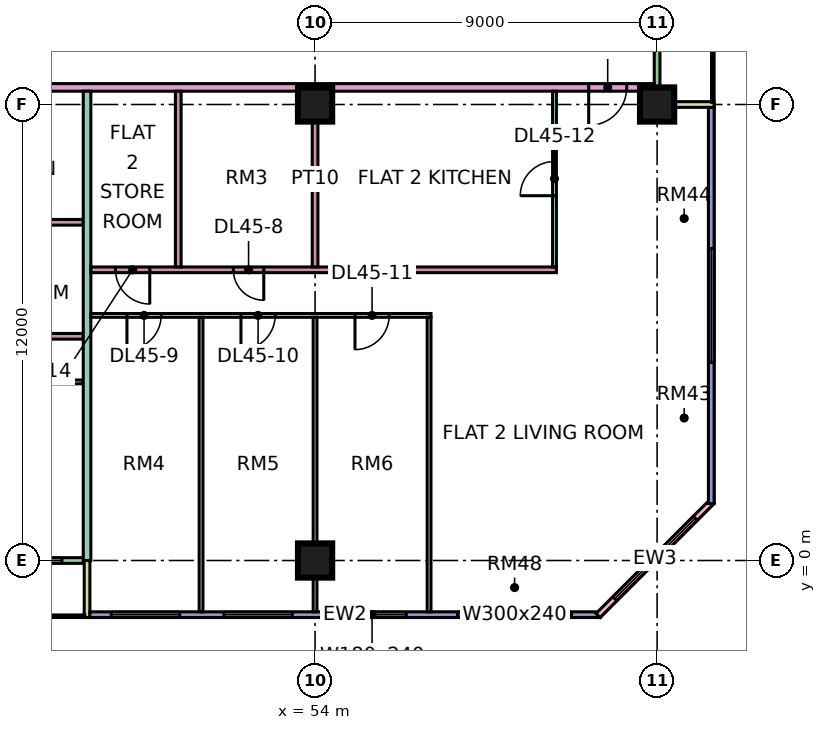
"""IFC4 building model, lengths in metres.
Left out: names, types, materials, properties, quantities, classifications, styles, units other than length and angle.
Written with IfcOpenShell. Run it as: python <this file> out.ifc"""

import sys

from ifc_helpers import new_model, si_unit, direction, frame, frame_2d, origin, origin_2d, place, context, subcontext, project, spatial, rectangle, extrude, element, fill, save


model = new_model("IFC4")
c1 = context("Model", 3, precision=1e-05, world=origin(), true_north=direction((0.0, 1.0)))
c2 = subcontext(c1, "Body", "Model", "MODEL_VIEW")
j1 = project(units=[si_unit("LENGTHUNIT", "METRE"), si_unit("PLANEANGLEUNIT", "RADIAN")], contexts=[c1])
p1 = place(None, origin())
s1 = spatial("IfcSite", under=j1, at=p1, CompositionType="ELEMENT")
p2 = place(p1, origin())
s2 = spatial("IfcBuilding", under=s1, at=p2, CompositionType="ELEMENT")
p3 = place(p2, frame((0.0, 0.0, 194.9)))
s3 = spatial("IfcBuildingStorey", under=s2, at=p3, CompositionType="ELEMENT", Elevation=194.9)
for number, where, z_axis, x_axis in (
    (1, (54.0, 0.0, 0.0), (0.0, 0.0, 1.0), (1.0, 0.0, 0.0)),
    (2, (54.0, 12.0, 0.0), (0.0, 0.0, 1.0), (1.0, 0.0, 0.0)),
    (3, (63.0, 12.0, 0.0), (0.0, 0.0, 1.0), (1.0, 0.0, 0.0)),
):
    element("IfcColumn", number, at=place(p3, frame(where, z_axis=z_axis, x_axis=x_axis)), inside=s3, PredefinedType="COLUMN", context=c2, shape_type="SweptSolid", body=[
        extrude(rectangle(XDim=0.9, YDim=0.9, at=origin_2d()), origin(), (0.0, 0.0, 1.0), 3.75),
    ])
p4 = place(p3, frame((36.075, 0.0, 0.0), z_axis=(0.0, 0.0, 1.0), x_axis=(1.0, 0.0, 0.0)))
e4 = element("IfcWall", 4, at=p4, inside=s3, PredefinedType="SOLIDWALL", context=c2, shape_type="SweptSolid", body=[
    extrude(rectangle(XDim=11.85, YDim=0.15, at=frame_2d((5.925, 0.0))), origin(), (0.0, 0.0, 1.0), 3.35),
])
p5 = place(p4, frame((1.1, 0.0, 0.0)))
e5 = element("IfcOpeningElement", 5, at=p5, cuts=e4, PredefinedType="OPENING", context=c2, shape_type="SweptSolid", body=[
    extrude(rectangle(XDim=1.2, YDim=2.4, at=frame_2d((0.6, 1.2))), frame((0.0, 0.085, 0.0), z_axis=(0.0, -1.0, 0.0), x_axis=(1.0, 0.0, 0.0)), (0.0, 0.0, 1.0), 0.17),
])
p6 = place(p4, frame((4.15, 0.0, 0.45)))
e6 = element("IfcOpeningElement", 6, at=p6, cuts=e4, PredefinedType="OPENING", context=c2, shape_type="SweptSolid", body=[
    extrude(rectangle(XDim=3.0, YDim=2.4, at=frame_2d((1.5, 1.2))), frame((0.0, 0.085, 0.0), z_axis=(0.0, -1.0, 0.0), x_axis=(1.0, 0.0, 0.0)), (0.0, 0.0, 1.0), 0.17),
])
p7 = place(p4, frame((10.062, 0.0, 0.45)))
e7 = element("IfcOpeningElement", 7, at=p7, cuts=e4, PredefinedType="OPENING", context=c2, shape_type="SweptSolid", body=[
    extrude(rectangle(XDim=1.2, YDim=2.4, at=frame_2d((0.6, 1.2))), frame((0.0, 0.085, 0.0), z_axis=(0.0, -1.0, 0.0), x_axis=(1.0, 0.0, 0.0)), (0.0, 0.0, 1.0), 0.17),
])
p8 = place(p3, frame((48.0, -1.5, 0.0), z_axis=(0.0, 0.0, 1.0), x_axis=(0.0, 1.0, 0.0)))
e8 = element("IfcWall", 8, at=p8, inside=s3, PredefinedType="SOLIDWALL", context=c2, shape_type="SweptSolid", body=[
    extrude(rectangle(XDim=1.5, YDim=0.15, at=frame_2d((0.75, 0.0))), origin(), (0.0, 0.0, 1.0), 3.35),
])
p9 = place(p3, frame((48.075, -1.425, 0.0), z_axis=(0.0, 0.0, 1.0), x_axis=(1.0, 0.0, 0.0)))
e9 = element("IfcWall", 9, at=p9, inside=s3, PredefinedType="SOLIDWALL", context=c2, shape_type="SweptSolid", body=[
    extrude(rectangle(XDim=13.425, YDim=0.15, at=frame_2d((6.712, 0.0))), origin(), (0.0, 0.0, 1.0), 3.35),
])
p10 = place(p9, frame((0.562, 0.0, 0.45)))
e10 = element("IfcOpeningElement", 10, at=p10, cuts=e9, PredefinedType="OPENING", context=c2, shape_type="SweptSolid", body=[
    extrude(rectangle(XDim=1.8, YDim=2.4, at=frame_2d((0.9, 1.2))), frame((0.0, 0.085, 0.0), z_axis=(0.0, -1.0, 0.0), x_axis=(1.0, 0.0, 0.0)), (0.0, 0.0, 1.0), 0.17),
])
p11 = place(p9, frame((3.525, 0.0, 0.45)))
e11 = element("IfcOpeningElement", 11, at=p11, cuts=e9, PredefinedType="OPENING", context=c2, shape_type="SweptSolid", body=[
    extrude(rectangle(XDim=1.8, YDim=2.4, at=frame_2d((0.9, 1.2))), frame((0.0, 0.085, 0.0), z_axis=(0.0, -1.0, 0.0), x_axis=(1.0, 0.0, 0.0)), (0.0, 0.0, 1.0), 0.17),
])
p12 = place(p9, frame((6.525, 0.0, 0.45)))
e12 = element("IfcOpeningElement", 12, at=p12, cuts=e9, PredefinedType="OPENING", context=c2, shape_type="SweptSolid", body=[
    extrude(rectangle(XDim=1.8, YDim=2.4, at=frame_2d((0.9, 1.2))), frame((0.0, 0.085, 0.0), z_axis=(0.0, -1.0, 0.0), x_axis=(1.0, 0.0, 0.0)), (0.0, 0.0, 1.0), 0.17),
])
p13 = place(p9, frame((9.675, 0.0, 0.45)))
e13 = element("IfcOpeningElement", 13, at=p13, cuts=e9, PredefinedType="OPENING", context=c2, shape_type="SweptSolid", body=[
    extrude(rectangle(XDim=3.0, YDim=2.4, at=frame_2d((1.5, 1.2))), frame((0.0, 0.085, 0.0), z_axis=(0.0, -1.0, 0.0), x_axis=(1.0, 0.0, 0.0)), (0.0, 0.0, 1.0), 0.17),
])
p14 = place(p3, frame((61.447, -1.447, 0.0), z_axis=(0.0, 0.0, 1.0), x_axis=(0.707106781187, 0.707106781187, 0.0)))
e14 = element("IfcWall", 14, at=p14, inside=s3, PredefinedType="SOLIDWALL", context=c2, shape_type="SweptSolid", body=[
    extrude(rectangle(XDim=4.243, YDim=0.15, at=frame_2d((2.121, 0.0))), origin(), (0.0, 0.0, 1.0), 3.35),
])
p15 = place(p14, frame((0.621, 0.0, 0.45)))
e15 = element("IfcOpeningElement", 15, at=p15, cuts=e14, PredefinedType="OPENING", context=c2, shape_type="SweptSolid", body=[
    extrude(rectangle(XDim=3.0, YDim=2.4, at=frame_2d((1.5, 1.2))), frame((0.0, 0.085, 0.0), z_axis=(0.0, -1.0, 0.0), x_axis=(1.0, 0.0, 0.0)), (0.0, 0.0, 1.0), 0.17),
])
p16 = place(p3, frame((64.425, 1.5, 0.0), z_axis=(0.0, 0.0, 1.0), x_axis=(0.0, 1.0, 0.0)))
e16 = element("IfcWall", 16, at=p16, inside=s3, PredefinedType="SOLIDWALL", context=c2, shape_type="SweptSolid", body=[
    extrude(rectangle(XDim=10.425, YDim=0.15, at=frame_2d((5.212, 0.0))), origin(), (0.0, 0.0, 1.0), 3.35),
])
p17 = place(p16, frame((3.712, 0.0, 0.45)))
e17 = element("IfcOpeningElement", 17, at=p17, cuts=e16, PredefinedType="OPENING", context=c2, shape_type="SweptSolid", body=[
    extrude(rectangle(XDim=3.0, YDim=2.4, at=frame_2d((1.5, 1.2))), frame((0.0, 0.085, 0.0), z_axis=(0.0, -1.0, 0.0), x_axis=(1.0, 0.0, 0.0)), (0.0, 0.0, 1.0), 0.17),
])
p18 = place(p3, frame((63.0, 12.075, 0.0), z_axis=(0.0, 0.0, 1.0), x_axis=(0.0, 1.0, 0.0)))
e18 = element("IfcWall", 18, at=p18, inside=s3, PredefinedType="SOLIDWALL", context=c2, shape_type="SweptSolid", body=[
    extrude(rectangle(XDim=10.35, YDim=0.15, at=frame_2d((5.175, 0.0))), origin(), (0.0, 0.0, 1.0), 3.35),
])
p19 = place(p18, frame((4.125, 0.0, 0.45)))
e19 = element("IfcOpeningElement", 19, at=p19, cuts=e18, PredefinedType="OPENING", context=c2, shape_type="SweptSolid", body=[
    extrude(rectangle(XDim=1.8, YDim=2.4, at=frame_2d((0.9, 1.2))), frame((0.0, 0.085, 0.0), z_axis=(0.0, -1.0, 0.0), x_axis=(1.0, 0.0, 0.0)), (0.0, 0.0, 1.0), 0.17),
])
p20 = place(p18, frame((8.137, 0.0, 0.45)))
e20 = element("IfcOpeningElement", 20, at=p20, cuts=e18, PredefinedType="OPENING", context=c2, shape_type="SweptSolid", body=[
    extrude(rectangle(XDim=1.8, YDim=2.4, at=frame_2d((0.9, 1.2))), frame((0.0, 0.085, 0.0), z_axis=(0.0, -1.0, 0.0), x_axis=(1.0, 0.0, 0.0)), (0.0, 0.0, 1.0), 0.17),
])
p21 = place(p3, frame((64.5, 12.0, 0.0), z_axis=(0.0, 0.0, 1.0), x_axis=(-1.0, 0.0, 0.0)))
e21 = element("IfcWall", 21, at=p21, inside=s3, PredefinedType="SOLIDWALL", context=c2, shape_type="SweptSolid", body=[
    extrude(rectangle(XDim=1.5, YDim=0.15, at=frame_2d((0.75, 0.0))), origin(), (0.0, 0.0, 1.0), 3.35),
])
p22 = place(p3, frame((33.05, 4.7, 0.0), z_axis=(0.0, 0.0, 1.0), x_axis=(1.0, 0.0, 0.0)))
e22 = element("IfcWall", 22, at=p22, inside=s3, PredefinedType="PARTITIONING", context=c2, shape_type="SweptSolid", body=[
    extrude(rectangle(XDim=14.85, YDim=0.1, at=frame_2d((7.425, 0.0))), origin(), (0.0, 0.0, 1.0), 3.35),
])
p23 = place(p22, frame((1.0, 0.0, 0.0)))
e23 = element("IfcOpeningElement", 23, at=p23, cuts=e22, PredefinedType="OPENING", context=c2, shape_type="SweptSolid", body=[
    extrude(rectangle(XDim=0.9, YDim=2.1, at=frame_2d((0.45, 1.05))), frame((0.0, 0.06, 0.0), z_axis=(0.0, -1.0, 0.0), x_axis=(1.0, 0.0, 0.0)), (0.0, 0.0, 1.0), 0.12),
])
p24 = place(p22, frame((4.0, 0.0, 0.0)))
e24 = element("IfcOpeningElement", 24, at=p24, cuts=e22, PredefinedType="OPENING", context=c2, shape_type="SweptSolid", body=[
    extrude(rectangle(XDim=0.9, YDim=2.1, at=frame_2d((0.45, 1.05))), frame((0.0, 0.06, 0.0), z_axis=(0.0, -1.0, 0.0), x_axis=(1.0, 0.0, 0.0)), (0.0, 0.0, 1.0), 0.12),
])
p25 = place(p22, frame((10.0, 0.0, 0.0)))
e25 = element("IfcOpeningElement", 25, at=p25, cuts=e22, PredefinedType="OPENING", context=c2, shape_type="SweptSolid", body=[
    extrude(rectangle(XDim=0.9, YDim=2.1, at=frame_2d((0.45, 1.05))), frame((0.0, 0.06, 0.0), z_axis=(0.0, -1.0, 0.0), x_axis=(1.0, 0.0, 0.0)), (0.0, 0.0, 1.0), 0.12),
])
p26 = place(p3, frame((40.65, 12.45, 0.0), z_axis=(0.0, 0.0, 1.0), x_axis=(1.0, 0.0, 0.0)))
e26 = element("IfcWall", 26, at=p26, inside=s3, PredefinedType="PARTITIONING", context=c2, shape_type="SweptSolid", body=[
    extrude(rectangle(XDim=22.276, YDim=0.2, at=frame_2d((11.138, 0.0))), origin(), (0.0, 0.0, 1.0), 3.35),
])
p27 = place(p26, frame((20.55, 0.0, 0.0)))
e27 = element("IfcOpeningElement", 27, at=p27, cuts=e26, PredefinedType="OPENING", context=c2, shape_type="SweptSolid", body=[
    extrude(rectangle(XDim=1.0, YDim=2.1, at=frame_2d((0.5, 1.05))), frame((0.0, 0.11, 0.0), z_axis=(0.0, -1.0, 0.0), x_axis=(1.0, 0.0, 0.0)), (0.0, 0.0, 1.0), 0.22),
])
p28 = place(p26, frame((1.05, 0.0, 0.0)))
e28 = element("IfcOpeningElement", 28, at=p28, cuts=e26, PredefinedType="OPENING", context=c2, shape_type="SweptSolid", body=[
    extrude(rectangle(XDim=1.0, YDim=2.1, at=frame_2d((0.5, 1.05))), frame((0.0, 0.11, 0.0), z_axis=(0.0, -1.0, 0.0), x_axis=(1.0, 0.0, 0.0)), (0.0, 0.0, 1.0), 0.22),
])
p29 = place(p3, frame((43.725, 5.9, 0.0), z_axis=(0.0, 0.0, 1.0), x_axis=(1.0, 0.0, 0.0)))
e29 = element("IfcWall", 29, at=p29, inside=s3, PredefinedType="PARTITIONING", context=c2, shape_type="SweptSolid", body=[
    extrude(rectangle(XDim=4.175, YDim=0.15, at=frame_2d((2.087, 0.0))), origin(), (0.0, 0.0, 1.0), 3.35),
])
p30 = place(p29, frame((1.675, 0.0, 0.0)))
e30 = element("IfcOpeningElement", 30, at=p30, cuts=e29, PredefinedType="OPENING", context=c2, shape_type="SweptSolid", body=[
    extrude(rectangle(XDim=0.8, YDim=2.1, at=frame_2d((0.4, 1.05))), frame((0.0, 0.085, 0.0), z_axis=(0.0, -1.0, 0.0), x_axis=(1.0, 0.0, 0.0)), (0.0, 0.0, 1.0), 0.17),
])
p31 = place(p3, frame((43.725, 8.9, 0.0), z_axis=(0.0, 0.0, 1.0), x_axis=(1.0, 0.0, 0.0)))
e31 = element("IfcWall", 31, at=p31, inside=s3, PredefinedType="PARTITIONING", context=c2, shape_type="SweptSolid", body=[
    extrude(rectangle(XDim=4.175, YDim=0.15, at=frame_2d((2.087, 0.0))), origin(), (0.0, 0.0, 1.0), 3.35),
])
p32 = place(p3, frame((48.0, 0.0, 0.0), z_axis=(0.0, 0.0, 1.0), x_axis=(0.0, 1.0, 0.0)))
e32 = element("IfcWall", 32, at=p32, inside=s3, PredefinedType="PARTITIONING", context=c2, shape_type="SweptSolid", body=[
    extrude(rectangle(XDim=12.35, YDim=0.2, at=frame_2d((6.175, 0.0))), origin(), (0.0, 0.0, 1.0), 3.35),
])
p33 = place(p3, frame((48.1, 6.45, 0.0), z_axis=(0.0, 0.0, 1.0), x_axis=(1.0, 0.0, 0.0)))
e33 = element("IfcWall", 33, at=p33, inside=s3, PredefinedType="PARTITIONING", context=c2, shape_type="SweptSolid", body=[
    extrude(rectangle(XDim=8.95, YDim=0.1, at=frame_2d((4.475, 0.0))), origin(), (0.0, 0.0, 1.0), 3.35),
])
p34 = place(p33, frame((0.95, 0.0, 0.0)))
e34 = element("IfcOpeningElement", 34, at=p34, cuts=e33, PredefinedType="OPENING", context=c2, shape_type="SweptSolid", body=[
    extrude(rectangle(XDim=0.9, YDim=2.1, at=frame_2d((0.45, 1.05))), frame((0.0, 0.06, 0.0), z_axis=(0.0, -1.0, 0.0), x_axis=(1.0, 0.0, 0.0)), (0.0, 0.0, 1.0), 0.12),
])
p35 = place(p33, frame((3.95, 0.0, 0.0)))
e35 = element("IfcOpeningElement", 35, at=p35, cuts=e33, PredefinedType="OPENING", context=c2, shape_type="SweptSolid", body=[
    extrude(rectangle(XDim=0.9, YDim=2.1, at=frame_2d((0.45, 1.05))), frame((0.0, 0.06, 0.0), z_axis=(0.0, -1.0, 0.0), x_axis=(1.0, 0.0, 0.0)), (0.0, 0.0, 1.0), 0.12),
])
p36 = place(p33, frame((6.95, 0.0, 0.0)))
e36 = element("IfcOpeningElement", 36, at=p36, cuts=e33, PredefinedType="OPENING", context=c2, shape_type="SweptSolid", body=[
    extrude(rectangle(XDim=0.9, YDim=2.1, at=frame_2d((0.45, 1.05))), frame((0.0, 0.06, 0.0), z_axis=(0.0, -1.0, 0.0), x_axis=(1.0, 0.0, 0.0)), (0.0, 0.0, 1.0), 0.12),
])
p37 = place(p3, frame((48.1, 7.65, 0.0), z_axis=(0.0, 0.0, 1.0), x_axis=(1.0, 0.0, 0.0)))
e37 = element("IfcWall", 37, at=p37, inside=s3, PredefinedType="PARTITIONING", context=c2, shape_type="SweptSolid", body=[
    extrude(rectangle(XDim=12.25, YDim=0.15, at=frame_2d((6.125, 0.0))), origin(), (0.0, 0.0, 1.0), 3.35),
])
p38 = place(p37, frame((3.75, 0.0, 0.0)))
e38 = element("IfcOpeningElement", 38, at=p38, cuts=e37, PredefinedType="OPENING", context=c2, shape_type="SweptSolid", body=[
    extrude(rectangle(XDim=0.8, YDim=2.1, at=frame_2d((0.4, 1.05))), frame((0.0, 0.085, 0.0), z_axis=(0.0, -1.0, 0.0), x_axis=(1.0, 0.0, 0.0)), (0.0, 0.0, 1.0), 0.17),
])
p39 = place(p37, frame((0.65, 0.0, 0.0)))
e39 = element("IfcOpeningElement", 39, at=p39, cuts=e37, PredefinedType="OPENING", context=c2, shape_type="SweptSolid", body=[
    extrude(rectangle(XDim=0.9, YDim=2.1, at=frame_2d((0.45, 1.05))), frame((0.0, 0.085, 0.0), z_axis=(0.0, -1.0, 0.0), x_axis=(1.0, 0.0, 0.0)), (0.0, 0.0, 1.0), 0.17),
])
p40 = place(p3, frame((50.4, 7.725, 0.0), z_axis=(0.0, 0.0, 1.0), x_axis=(0.0, 1.0, 0.0)))
e40 = element("IfcWall", 40, at=p40, inside=s3, PredefinedType="PARTITIONING", context=c2, shape_type="SweptSolid", body=[
    extrude(rectangle(XDim=4.625, YDim=0.15, at=frame_2d((2.312, 0.0))), origin(), (0.0, 0.0, 1.0), 3.35),
])
for number, where, z_axis, x_axis in (
    (41, (51.0, -1.351, 0.0), (0.0, 0.0, 1.0), (0.0, 1.0, 0.0)),
    (42, (54.0, -1.351, 0.0), (0.0, 0.0, 1.0), (0.0, 1.0, 0.0)),
):
    element("IfcWall", number, at=place(p3, frame(where, z_axis=z_axis, x_axis=x_axis)), inside=s3, PredefinedType="PARTITIONING", context=c2, shape_type="SweptSolid", body=[
        extrude(rectangle(XDim=7.751, YDim=0.1, at=frame_2d((3.875, 0.0))), origin(), (0.0, 0.0, 1.0), 3.35),
    ])
p41 = place(p3, frame((54.0, 7.725, 0.0), z_axis=(0.0, 0.0, 1.0), x_axis=(0.0, 1.0, 0.0)))
e43 = element("IfcWall", 43, at=p41, inside=s3, PredefinedType="PARTITIONING", context=c2, shape_type="SweptSolid", body=[
    extrude(rectangle(XDim=4.625, YDim=0.15, at=frame_2d((2.312, 0.0))), origin(), (0.0, 0.0, 1.0), 3.35),
])
p42 = place(p3, frame((57.0, -1.35, 0.0), z_axis=(0.0, 0.0, 1.0), x_axis=(0.0, 1.0, 0.0)))
e44 = element("IfcWall", 44, at=p42, inside=s3, PredefinedType="PARTITIONING", context=c2, shape_type="SweptSolid", body=[
    extrude(rectangle(XDim=7.75, YDim=0.1, at=frame_2d((3.875, 0.0))), origin(), (0.0, 0.0, 1.0), 3.35),
])
p43 = place(p3, frame((60.3, 7.725, 0.0), z_axis=(0.0, 0.0, 1.0), x_axis=(0.0, 1.0, 0.0)))
e45 = element("IfcWall", 45, at=p43, inside=s3, PredefinedType="PARTITIONING", context=c2, shape_type="SweptSolid", body=[
    extrude(rectangle(XDim=4.625, YDim=0.1, at=frame_2d((2.312, 0.0))), origin(), (0.0, 0.0, 1.0), 3.35),
])
p44 = place(p43, frame((1.875, 0.0, 0.0)))
e46 = element("IfcOpeningElement", 46, at=p44, cuts=e45, PredefinedType="OPENING", context=c2, shape_type="SweptSolid", body=[
    extrude(rectangle(XDim=0.9, YDim=2.1, at=frame_2d((0.45, 1.05))), frame((0.0, 0.06, 0.0), z_axis=(0.0, -1.0, 0.0), x_axis=(1.0, 0.0, 0.0)), (0.0, 0.0, 1.0), 0.12),
])
p45 = place(p7, origin())
e47 = element("IfcWindow", 47, at=p45, inside=s3, PartitioningType="SINGLE_PANEL", PredefinedType="WINDOW", context=c2, shape_type="SweptSolid", body=[
    extrude(rectangle(XDim=1.2, YDim=2.4, at=frame_2d((0.6, 1.2))), frame((0.0, 0.03, 0.0), z_axis=(0.0, -1.0, 0.0), x_axis=(1.0, 0.0, 0.0)), (0.0, 0.0, 1.0), 0.06),
])
fill(e7, e47)
p46 = place(p10, origin())
e48 = element("IfcWindow", 48, at=p46, inside=s3, PartitioningType="SINGLE_PANEL", PredefinedType="WINDOW", context=c2, shape_type="SweptSolid", body=[
    extrude(rectangle(XDim=1.8, YDim=2.4, at=frame_2d((0.9, 1.2))), frame((0.0, 0.03, 0.0), z_axis=(0.0, -1.0, 0.0), x_axis=(1.0, 0.0, 0.0)), (0.0, 0.0, 1.0), 0.06),
])
fill(e10, e48)
p47 = place(p11, origin())
e49 = element("IfcWindow", 49, at=p47, inside=s3, PartitioningType="SINGLE_PANEL", PredefinedType="WINDOW", context=c2, shape_type="SweptSolid", body=[
    extrude(rectangle(XDim=1.8, YDim=2.4, at=frame_2d((0.9, 1.2))), frame((0.0, 0.03, 0.0), z_axis=(0.0, -1.0, 0.0), x_axis=(1.0, 0.0, 0.0)), (0.0, 0.0, 1.0), 0.06),
])
fill(e11, e49)
p48 = place(p12, origin())
e50 = element("IfcWindow", 50, at=p48, inside=s3, PartitioningType="SINGLE_PANEL", PredefinedType="WINDOW", context=c2, shape_type="SweptSolid", body=[
    extrude(rectangle(XDim=1.8, YDim=2.4, at=frame_2d((0.9, 1.2))), frame((0.0, 0.03, 0.0), z_axis=(0.0, -1.0, 0.0), x_axis=(1.0, 0.0, 0.0)), (0.0, 0.0, 1.0), 0.06),
])
fill(e12, e50)
p49 = place(p13, origin())
e51 = element("IfcWindow", 51, at=p49, inside=s3, PartitioningType="SINGLE_PANEL", PredefinedType="WINDOW", context=c2, shape_type="SweptSolid", body=[
    extrude(rectangle(XDim=3.0, YDim=2.4, at=frame_2d((1.5, 1.2))), frame((0.0, 0.03, 0.0), z_axis=(0.0, -1.0, 0.0), x_axis=(1.0, 0.0, 0.0)), (0.0, 0.0, 1.0), 0.06),
])
fill(e13, e51)
p50 = place(p15, origin())
e52 = element("IfcWindow", 52, at=p50, inside=s3, PartitioningType="SINGLE_PANEL", PredefinedType="WINDOW", context=c2, shape_type="SweptSolid", body=[
    extrude(rectangle(XDim=3.0, YDim=2.4, at=frame_2d((1.5, 1.2))), frame((0.0, 0.03, 0.0), z_axis=(0.0, -1.0, 0.0), x_axis=(1.0, 0.0, 0.0)), (0.0, 0.0, 1.0), 0.06),
])
fill(e15, e52)
p51 = place(p17, origin())
e53 = element("IfcWindow", 53, at=p51, inside=s3, PartitioningType="SINGLE_PANEL", PredefinedType="WINDOW", context=c2, shape_type="SweptSolid", body=[
    extrude(rectangle(XDim=3.0, YDim=2.4, at=frame_2d((1.5, 1.2))), frame((0.0, 0.03, 0.0), z_axis=(0.0, -1.0, 0.0), x_axis=(1.0, 0.0, 0.0)), (0.0, 0.0, 1.0), 0.06),
])
fill(e17, e53)
p52 = place(p38, origin())
e54 = element("IfcDoor", 54, at=p52, inside=s3, OperationType="SINGLE_SWING_RIGHT", PredefinedType="DOOR", context=c2, shape_type="SweptSolid", body=[
    extrude(rectangle(XDim=0.8, YDim=2.1, at=frame_2d((0.4, 1.05))), frame((0.0, 0.025, 0.0), z_axis=(0.0, -1.0, 0.0), x_axis=(1.0, 0.0, 0.0)), (0.0, 0.0, 1.0), 0.05),
])
fill(e38, e54)
p53 = place(p34, frame((0.9, 0.0, 0.0), z_axis=(0.0, 0.0, 1.0), x_axis=(-1.0, 0.0, 0.0)))
e55 = element("IfcDoor", 55, at=p53, inside=s3, OperationType="SINGLE_SWING_LEFT", PredefinedType="DOOR", context=c2, shape_type="SweptSolid", body=[
    extrude(rectangle(XDim=0.9, YDim=2.1, at=frame_2d((0.45, 1.05))), frame((0.0, 0.025, 0.0), z_axis=(0.0, -1.0, 0.0), x_axis=(1.0, 0.0, 0.0)), (0.0, 0.0, 1.0), 0.05),
])
fill(e34, e55)
p54 = place(p35, frame((0.9, 0.0, 0.0), z_axis=(0.0, 0.0, 1.0), x_axis=(-1.0, 0.0, 0.0)))
e56 = element("IfcDoor", 56, at=p54, inside=s3, OperationType="SINGLE_SWING_LEFT", PredefinedType="DOOR", context=c2, shape_type="SweptSolid", body=[
    extrude(rectangle(XDim=0.9, YDim=2.1, at=frame_2d((0.45, 1.05))), frame((0.0, 0.025, 0.0), z_axis=(0.0, -1.0, 0.0), x_axis=(1.0, 0.0, 0.0)), (0.0, 0.0, 1.0), 0.05),
])
fill(e35, e56)
p55 = place(p36, frame((0.9, 0.0, 0.0), z_axis=(0.0, 0.0, 1.0), x_axis=(-1.0, 0.0, 0.0)))
e57 = element("IfcDoor", 57, at=p55, inside=s3, OperationType="SINGLE_SWING_LEFT", PredefinedType="DOOR", context=c2, shape_type="SweptSolid", body=[
    extrude(rectangle(XDim=0.9, YDim=2.1, at=frame_2d((0.45, 1.05))), frame((0.0, 0.025, 0.0), z_axis=(0.0, -1.0, 0.0), x_axis=(1.0, 0.0, 0.0)), (0.0, 0.0, 1.0), 0.05),
])
fill(e36, e57)
p56 = place(p44, origin())
e58 = element("IfcDoor", 58, at=p56, inside=s3, OperationType="SINGLE_SWING_LEFT", PredefinedType="DOOR", context=c2, shape_type="SweptSolid", body=[
    extrude(rectangle(XDim=0.9, YDim=2.1, at=frame_2d((0.45, 1.05))), frame((0.0, 0.025, 0.0), z_axis=(0.0, -1.0, 0.0), x_axis=(1.0, 0.0, 0.0)), (0.0, 0.0, 1.0), 0.05),
])
fill(e46, e58)
p57 = place(p27, frame((1.0, 0.0, 0.0), z_axis=(0.0, 0.0, 1.0), x_axis=(-1.0, 0.0, 0.0)))
e59 = element("IfcDoor", 59, at=p57, inside=s3, OperationType="SINGLE_SWING_LEFT", PredefinedType="DOOR", context=c2, shape_type="SweptSolid", body=[
    extrude(rectangle(XDim=1.0, YDim=2.1, at=frame_2d((0.5, 1.05))), frame((0.0, 0.025, 0.0), z_axis=(0.0, -1.0, 0.0), x_axis=(1.0, 0.0, 0.0)), (0.0, 0.0, 1.0), 0.05),
])
fill(e27, e59)
p58 = place(p39, origin())
e60 = element("IfcDoor", 60, at=p58, inside=s3, OperationType="SINGLE_SWING_RIGHT", PredefinedType="DOOR", context=c2, shape_type="SweptSolid", body=[
    extrude(rectangle(XDim=0.9, YDim=2.1, at=frame_2d((0.45, 1.05))), frame((0.0, 0.025, 0.0), z_axis=(0.0, -1.0, 0.0), x_axis=(1.0, 0.0, 0.0)), (0.0, 0.0, 1.0), 0.05),
])
fill(e39, e60)
save(model, sys.argv[1])
